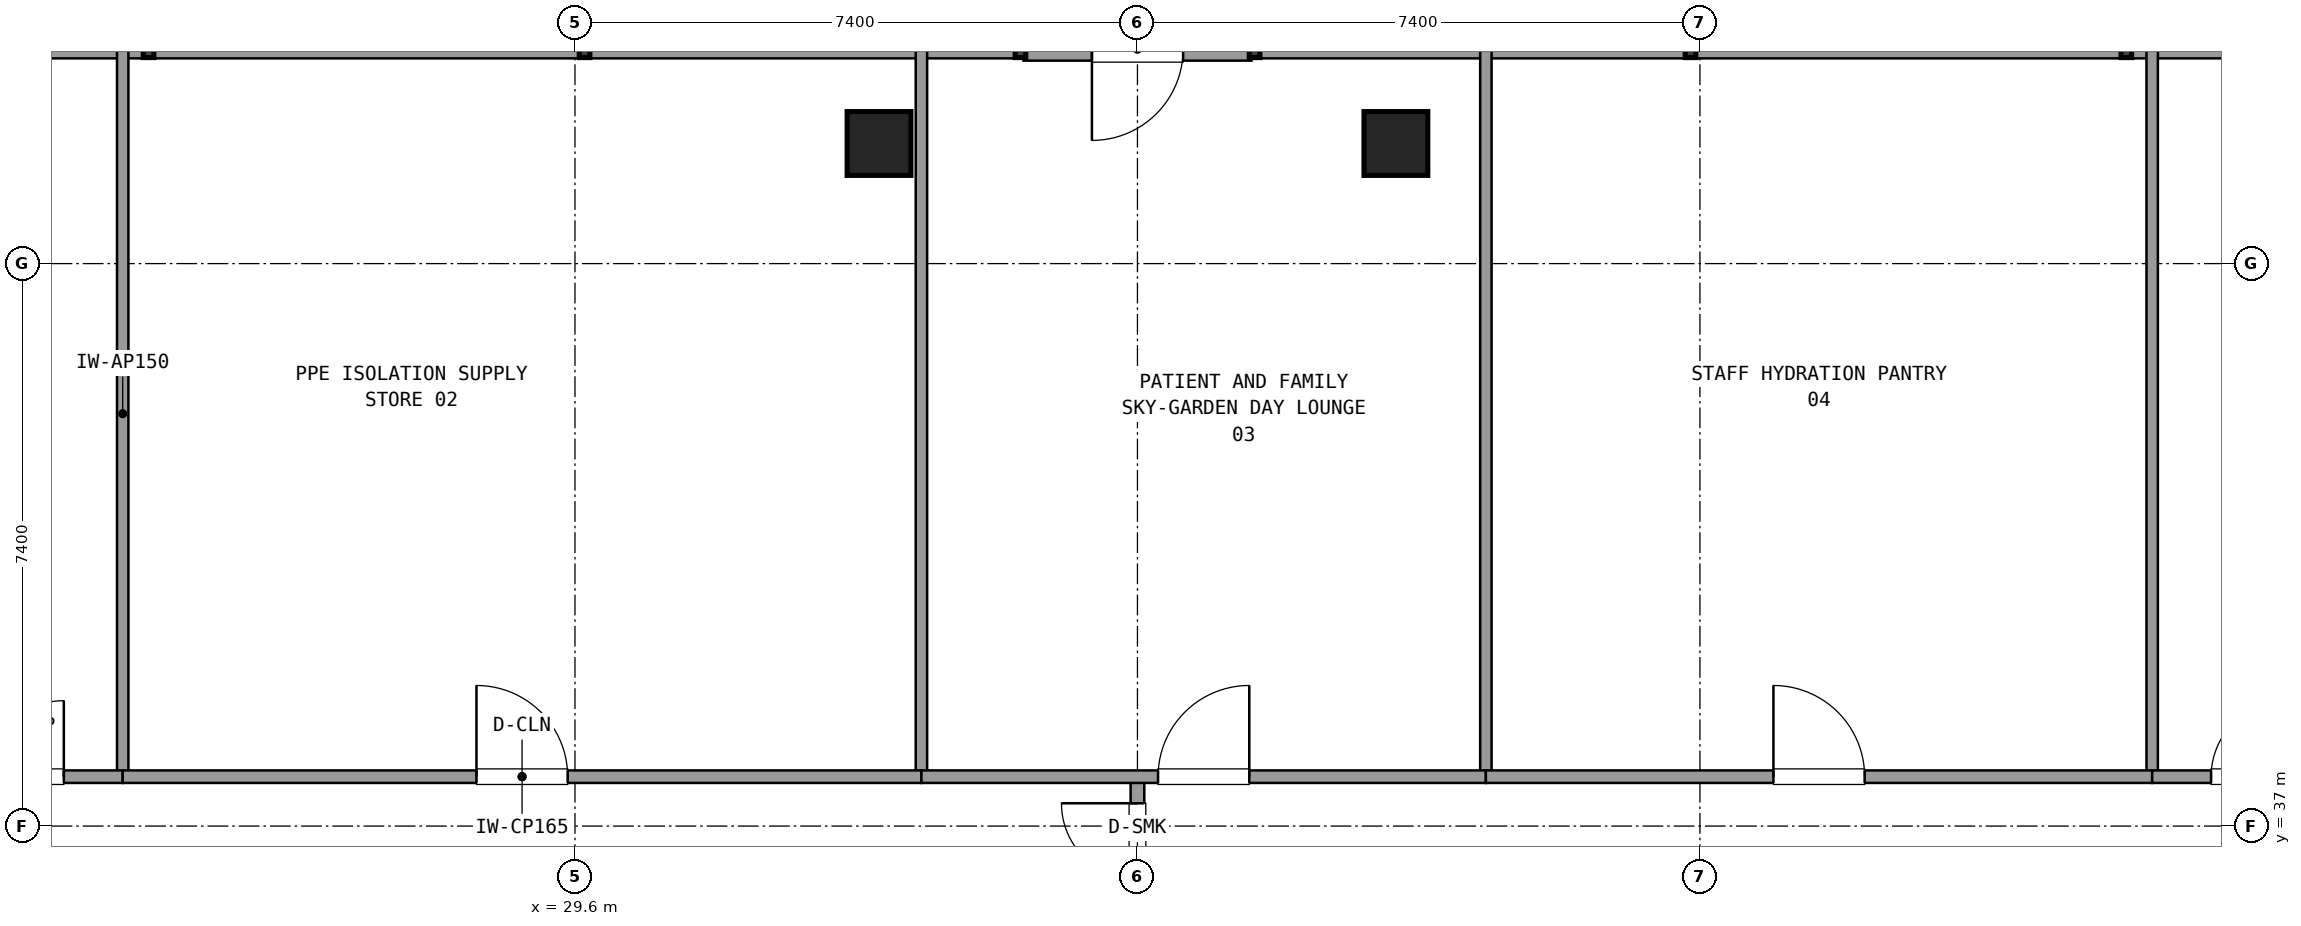
"""IFC4 building model, lengths in metres.
Left out: names, types, materials, properties, quantities, classifications, styles, units other than length and angle.
Written with IfcOpenShell. Run it as: python <this file> out.ifc"""

import sys

from ifc_helpers import new_model, si_unit, direction, frame, frame_2d, origin, origin_2d, place, context, subcontext, project, spatial, rectangle, extrude, element, fill, save


model = new_model("IFC4")
c1 = context("Model", 3, precision=1e-05, world=origin(), true_north=direction((0.0, 1.0)))
c2 = subcontext(c1, "Body", "Model", "MODEL_VIEW")
j1 = project(units=[si_unit("LENGTHUNIT", "METRE"), si_unit("PLANEANGLEUNIT", "RADIAN")], contexts=[c1])
p1 = place(None, origin())
s1 = spatial("IfcSite", under=j1, at=p1, CompositionType="ELEMENT")
p2 = place(p1, origin())
s2 = spatial("IfcBuilding", under=s1, at=p2, CompositionType="ELEMENT")
p3 = place(p2, frame((0.0, 0.0, 260.82)))
s3 = spatial("IfcBuildingStorey", under=s2, at=p3, CompositionType="ELEMENT", Elevation=260.82)
for number, where, z_axis, x_axis in (
    (1, (40.4, 45.98, 0.0), (0.0, 0.0, 1.0), (1.0, 0.0, 0.0)),
    (2, (33.6, 45.98, 0.0), (0.0, 0.0, 1.0), (1.0, 0.0, 0.0)),
):
    element("IfcColumn", number, at=place(p3, frame(where, z_axis=z_axis, x_axis=x_axis)), inside=s3, PredefinedType="COLUMN", context=c2, shape_type="SweptSolid", body=[
        extrude(rectangle(XDim=0.84, YDim=0.84, at=origin_2d()), origin(), (0.0, 0.0, 1.0), 3.6),
    ])
p4 = place(p3, frame((38.501, 47.22, 0.0), z_axis=(0.0, 0.0, 1.0), x_axis=(-1.0, 0.0, 0.0)))
e3 = element("IfcWall", 3, at=p4, inside=s3, PredefinedType="SOLIDWALL", context=c2, shape_type="SweptSolid", body=[
    extrude(rectangle(XDim=3.0, YDim=0.3, at=frame_2d((1.5, 0.0))), origin(), (0.0, 0.0, 1.0), 2.69),
])
p5 = place(p4, frame((0.9, 0.0, 0.0)))
e4 = element("IfcOpeningElement", 4, at=p5, cuts=e3, PredefinedType="OPENING", context=c2, shape_type="SweptSolid", body=[
    extrude(rectangle(XDim=1.2, YDim=2.2, at=frame_2d((0.6, 1.1))), frame((0.0, 0.16, 0.0), z_axis=(0.0, -1.0, 0.0), x_axis=(1.0, 0.0, 0.0)), (0.0, 0.0, 1.0), 0.32),
])
p6 = place(p3, frame((55.745, 47.22, 0.0), z_axis=(0.0, 0.0, 1.0), x_axis=(-1.0, 0.0, 0.0)))
e5 = element("IfcWall", 5, at=p6, inside=s3, PredefinedType="SOLIDWALL", context=c2, shape_type="SweptSolid", body=[
    extrude(rectangle(XDim=17.204, YDim=0.24, at=frame_2d((8.602, 0.0))), origin(), (0.0, 0.0, 1.0), 0.85),
])
p7 = place(p3, frame((35.461, 47.22, 0.0), z_axis=(0.0, 0.0, 1.0), x_axis=(-1.0, 0.0, 0.0)))
e6 = element("IfcWall", 6, at=p7, inside=s3, PredefinedType="SOLIDWALL", context=c2, shape_type="SweptSolid", body=[
    extrude(rectangle(XDim=17.206, YDim=0.24, at=frame_2d((8.603, 0.0))), origin(), (0.0, 0.0, 1.0), 0.85),
])
p8 = place(p3, frame((37.0, 34.95, 0.0), z_axis=(0.0, 0.0, 1.0), x_axis=(0.0, 1.0, 0.0)))
e7 = element("IfcWall", 7, at=p8, inside=s3, PredefinedType="PARTITIONING", context=c2, shape_type="SweptSolid", body=[
    extrude(rectangle(XDim=2.7, YDim=0.18, at=frame_2d((1.35, 0.0))), origin(), (0.0, 0.0, 1.0), 2.61),
])
p9 = place(p8, frame((0.35, 0.0, 0.0)))
e8 = element("IfcOpeningElement", 8, at=p9, cuts=e7, PredefinedType="OPENING", context=c2, shape_type="SweptSolid", body=[
    extrude(rectangle(XDim=2.0, YDim=2.2, at=frame_2d((1.0, 1.1))), frame((0.0, 0.1, 0.0), z_axis=(0.0, -1.0, 0.0), x_axis=(1.0, 0.0, 0.0)), (0.0, 0.0, 1.0), 0.2),
])
p10 = place(p3, frame((23.65, 37.65, 0.0), z_axis=(0.0, 0.0, 1.0), x_axis=(0.0, 1.0, 0.0)))
e9 = element("IfcWall", 9, at=p10, inside=s3, PredefinedType="PARTITIONING", context=c2, shape_type="SweptSolid", body=[
    extrude(rectangle(XDim=9.55, YDim=0.15, at=frame_2d((4.775, 0.0))), origin(), (0.0, 0.0, 1.0), 2.61),
])
p11 = place(p3, frame((21.1, 37.65, 0.0), z_axis=(0.0, 0.0, 1.0), x_axis=(1.0, 0.0, 0.0)))
e10 = element("IfcWall", 10, at=p11, inside=s3, PredefinedType="PARTITIONING", context=c2, shape_type="SweptSolid", body=[
    extrude(rectangle(XDim=2.55, YDim=0.165, at=frame_2d((1.275, 0.0))), origin(), (0.0, 0.0, 1.0), 2.61),
])
p12 = place(p11, frame((0.775, 0.0, 0.0)))
e11 = element("IfcOpeningElement", 11, at=p12, cuts=e10, PredefinedType="OPENING", context=c2, shape_type="SweptSolid", body=[
    extrude(rectangle(XDim=1.0, YDim=2.15, at=frame_2d((0.5, 1.075))), frame((0.0, 0.093, 0.0), z_axis=(0.0, -1.0, 0.0), x_axis=(1.0, 0.0, 0.0)), (0.0, 0.0, 1.0), 0.185),
])
p13 = place(p3, frame((34.158, 37.65, 0.0), z_axis=(0.0, 0.0, 1.0), x_axis=(0.0, 1.0, 0.0)))
e12 = element("IfcWall", 12, at=p13, inside=s3, PredefinedType="PARTITIONING", context=c2, shape_type="SweptSolid", body=[
    extrude(rectangle(XDim=9.55, YDim=0.15, at=frame_2d((4.775, 0.0))), origin(), (0.0, 0.0, 1.0), 2.61),
])
p14 = place(p3, frame((23.65, 37.65, 0.0), z_axis=(0.0, 0.0, 1.0), x_axis=(1.0, 0.0, 0.0)))
e13 = element("IfcWall", 13, at=p14, inside=s3, PredefinedType="PARTITIONING", context=c2, shape_type="SweptSolid", body=[
    extrude(rectangle(XDim=10.508, YDim=0.165, at=frame_2d((5.254, 0.0))), origin(), (0.0, 0.0, 1.0), 2.61),
])
p15 = place(p14, frame((4.654, 0.0, 0.0)))
e14 = element("IfcOpeningElement", 14, at=p15, cuts=e13, PredefinedType="OPENING", context=c2, shape_type="SweptSolid", body=[
    extrude(rectangle(XDim=1.2, YDim=2.15, at=frame_2d((0.6, 1.075))), frame((0.0, 0.093, 0.0), z_axis=(0.0, -1.0, 0.0), x_axis=(1.0, 0.0, 0.0)), (0.0, 0.0, 1.0), 0.185),
])
p16 = place(p3, frame((41.584, 37.65, 0.0), z_axis=(0.0, 0.0, 1.0), x_axis=(0.0, 1.0, 0.0)))
e15 = element("IfcWall", 15, at=p16, inside=s3, PredefinedType="PARTITIONING", context=c2, shape_type="SweptSolid", body=[
    extrude(rectangle(XDim=9.55, YDim=0.15, at=frame_2d((4.775, 0.0))), origin(), (0.0, 0.0, 1.0), 2.61),
])
p17 = place(p3, frame((34.158, 37.65, 0.0), z_axis=(0.0, 0.0, 1.0), x_axis=(1.0, 0.0, 0.0)))
e16 = element("IfcWall", 16, at=p17, inside=s3, PredefinedType="PARTITIONING", context=c2, shape_type="SweptSolid", body=[
    extrude(rectangle(XDim=7.426, YDim=0.165, at=frame_2d((3.713, 0.0))), origin(), (0.0, 0.0, 1.0), 2.61),
])
p18 = place(p17, frame((3.113, 0.0, 0.0)))
e17 = element("IfcOpeningElement", 17, at=p18, cuts=e16, PredefinedType="OPENING", context=c2, shape_type="SweptSolid", body=[
    extrude(rectangle(XDim=1.2, YDim=2.15, at=frame_2d((0.6, 1.075))), frame((0.0, 0.093, 0.0), z_axis=(0.0, -1.0, 0.0), x_axis=(1.0, 0.0, 0.0)), (0.0, 0.0, 1.0), 0.185),
])
p19 = place(p3, frame((50.35, 37.65, 0.0), z_axis=(0.0, 0.0, 1.0), x_axis=(0.0, 1.0, 0.0)))
e18 = element("IfcWall", 18, at=p19, inside=s3, PredefinedType="PARTITIONING", context=c2, shape_type="SweptSolid", body=[
    extrude(rectangle(XDim=9.55, YDim=0.15, at=frame_2d((4.775, 0.0))), origin(), (0.0, 0.0, 1.0), 2.61),
])
p20 = place(p3, frame((41.584, 37.65, 0.0), z_axis=(0.0, 0.0, 1.0), x_axis=(1.0, 0.0, 0.0)))
e19 = element("IfcWall", 19, at=p20, inside=s3, PredefinedType="PARTITIONING", context=c2, shape_type="SweptSolid", body=[
    extrude(rectangle(XDim=8.766, YDim=0.165, at=frame_2d((4.383, 0.0))), origin(), (0.0, 0.0, 1.0), 2.61),
])
p21 = place(p20, frame((3.783, 0.0, 0.0)))
e20 = element("IfcOpeningElement", 20, at=p21, cuts=e19, PredefinedType="OPENING", context=c2, shape_type="SweptSolid", body=[
    extrude(rectangle(XDim=1.2, YDim=2.15, at=frame_2d((0.6, 1.075))), frame((0.0, 0.093, 0.0), z_axis=(0.0, -1.0, 0.0), x_axis=(1.0, 0.0, 0.0)), (0.0, 0.0, 1.0), 0.185),
])
p22 = place(p3, frame((50.35, 37.65, 0.0), z_axis=(0.0, 0.0, 1.0), x_axis=(1.0, 0.0, 0.0)))
e21 = element("IfcWall", 21, at=p22, inside=s3, PredefinedType="PARTITIONING", context=c2, shape_type="SweptSolid", body=[
    extrude(rectangle(XDim=2.55, YDim=0.165, at=frame_2d((1.275, 0.0))), origin(), (0.0, 0.0, 1.0), 2.61),
])
p23 = place(p22, frame((0.775, 0.0, 0.0)))
e22 = element("IfcOpeningElement", 22, at=p23, cuts=e21, PredefinedType="OPENING", context=c2, shape_type="SweptSolid", body=[
    extrude(rectangle(XDim=1.0, YDim=2.15, at=frame_2d((0.5, 1.075))), frame((0.0, 0.093, 0.0), z_axis=(0.0, -1.0, 0.0), x_axis=(1.0, 0.0, 0.0)), (0.0, 0.0, 1.0), 0.185),
])
p24 = place(p9, origin())
e23 = element("IfcDoor", 23, at=p24, inside=s3, OperationType="DOUBLE_DOOR_SINGLE_SWING", PredefinedType="DOOR", context=c2, shape_type="SweptSolid", body=[
    extrude(rectangle(XDim=2.0, YDim=2.2, at=frame_2d((1.0, 1.1))), frame((0.0, 0.025, 0.0), z_axis=(0.0, -1.0, 0.0), x_axis=(1.0, 0.0, 0.0)), (0.0, 0.0, 1.0), 0.05),
])
fill(e8, e23)
p25 = place(p12, origin())
e24 = element("IfcDoor", 24, at=p25, inside=s3, OperationType="SINGLE_SWING_RIGHT", PredefinedType="DOOR", context=c2, shape_type="SweptSolid", body=[
    extrude(rectangle(XDim=1.0, YDim=2.15, at=frame_2d((0.5, 1.075))), frame((0.0, 0.025, 0.0), z_axis=(0.0, -1.0, 0.0), x_axis=(1.0, 0.0, 0.0)), (0.0, 0.0, 1.0), 0.05),
])
fill(e11, e24)
p26 = place(p15, origin())
e25 = element("IfcDoor", 25, at=p26, inside=s3, OperationType="SINGLE_SWING_LEFT", PredefinedType="DOOR", context=c2, shape_type="SweptSolid", body=[
    extrude(rectangle(XDim=1.2, YDim=2.15, at=frame_2d((0.6, 1.075))), frame((0.0, 0.025, 0.0), z_axis=(0.0, -1.0, 0.0), x_axis=(1.0, 0.0, 0.0)), (0.0, 0.0, 1.0), 0.05),
])
fill(e14, e25)
p27 = place(p18, origin())
e26 = element("IfcDoor", 26, at=p27, inside=s3, OperationType="SINGLE_SWING_RIGHT", PredefinedType="DOOR", context=c2, shape_type="SweptSolid", body=[
    extrude(rectangle(XDim=1.2, YDim=2.15, at=frame_2d((0.6, 1.075))), frame((0.0, 0.025, 0.0), z_axis=(0.0, -1.0, 0.0), x_axis=(1.0, 0.0, 0.0)), (0.0, 0.0, 1.0), 0.05),
])
fill(e17, e26)
p28 = place(p21, origin())
e27 = element("IfcDoor", 27, at=p28, inside=s3, OperationType="SINGLE_SWING_LEFT", PredefinedType="DOOR", context=c2, shape_type="SweptSolid", body=[
    extrude(rectangle(XDim=1.2, YDim=2.15, at=frame_2d((0.6, 1.075))), frame((0.0, 0.025, 0.0), z_axis=(0.0, -1.0, 0.0), x_axis=(1.0, 0.0, 0.0)), (0.0, 0.0, 1.0), 0.05),
])
fill(e20, e27)
p29 = place(p23, origin())
e28 = element("IfcDoor", 28, at=p29, inside=s3, OperationType="SINGLE_SWING_RIGHT", PredefinedType="DOOR", context=c2, shape_type="SweptSolid", body=[
    extrude(rectangle(XDim=1.0, YDim=2.15, at=frame_2d((0.5, 1.075))), frame((0.0, 0.025, 0.0), z_axis=(0.0, -1.0, 0.0), x_axis=(1.0, 0.0, 0.0)), (0.0, 0.0, 1.0), 0.05),
])
fill(e22, e28)
save(model, sys.argv[1])
